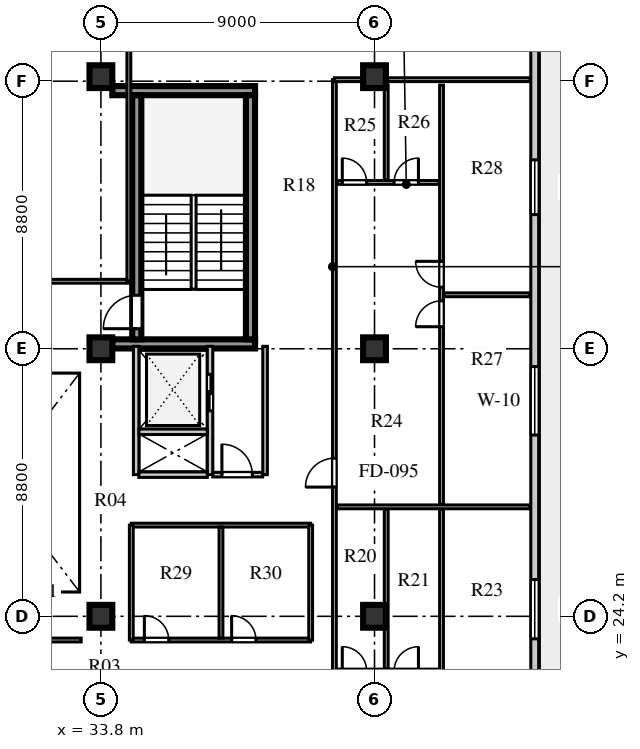
"""IFC4 building model, lengths in metres.
Left out: names, types, materials, properties, quantities, classifications, styles, units other than length and angle.
Written with IfcOpenShell. Run it as: python <this file> out.ifc"""

import sys

from ifc_helpers import new_model, si_unit, direction, frame, frame_2d, origin, origin_2d, place, context, subcontext, project, spatial, rectangle, extrude, element, fill, save


model = new_model("IFC4")
c1 = context("Model", 3, precision=1e-05, world=origin(), true_north=direction((0.0, 1.0)))
c2 = subcontext(c1, "Body", "Model", "MODEL_VIEW")
j1 = project(units=[si_unit("LENGTHUNIT", "METRE"), si_unit("PLANEANGLEUNIT", "RADIAN")], contexts=[c1])
p1 = place(None, origin())
s1 = spatial("IfcSite", under=j1, at=p1, CompositionType="ELEMENT")
p2 = place(p1, origin())
s2 = spatial("IfcBuilding", under=s1, at=p2, CompositionType="ELEMENT")
p3 = place(p2, frame((0.0, 0.0, 272.6)))
s3 = spatial("IfcBuildingStorey", under=s2, at=p3, CompositionType="ELEMENT", Elevation=272.6)
for number, where, z_axis, x_axis in (
    (1, (34.175, 33.16, 0.0), (0.0, 0.0, 1.0), (1.0, 0.0, 0.0)),
    (2, (34.175, 41.49, 0.0), (0.0, 0.0, 1.0), (1.0, 0.0, 0.0)),
):
    element("IfcWall", number, at=place(p3, frame(where, z_axis=z_axis, x_axis=x_axis)), inside=s3, PredefinedType="SHEAR", context=c2, shape_type="SweptSolid", body=[
        extrude(rectangle(XDim=4.695, YDim=0.3, at=frame_2d((2.348, 0.0))), origin(), (0.0, 0.0, 1.0), 3.66),
    ])
p4 = place(p3, frame((34.98, 33.31, 0.0), z_axis=(0.0, 0.0, 1.0), x_axis=(0.0, 1.0, 0.0)))
e3 = element("IfcWall", 3, at=p4, inside=s3, PredefinedType="SHEAR", context=c2, shape_type="SweptSolid", body=[
    extrude(rectangle(XDim=8.03, YDim=0.3, at=frame_2d((4.015, 0.0))), origin(), (0.0, 0.0, 1.0), 3.66),
])
p5 = place(p4, frame((0.35, 0.0, 0.0)))
e4 = element("IfcOpeningElement", 4, at=p5, cuts=e3, PredefinedType="OPENING", context=c2, shape_type="SweptSolid", body=[
    extrude(rectangle(XDim=1.1, YDim=2.1, at=frame_2d((0.55, 1.05))), frame((0.0, 0.16, 0.0), z_axis=(0.0, -1.0, 0.0), x_axis=(1.0, 0.0, 0.0)), (0.0, 0.0, 1.0), 0.32),
])
p6 = place(p3, frame((38.72, 33.31, 0.0), z_axis=(0.0, 0.0, 1.0), x_axis=(0.0, 1.0, 0.0)))
e5 = element("IfcWall", 5, at=p6, inside=s3, PredefinedType="SHEAR", context=c2, shape_type="SweptSolid", body=[
    extrude(rectangle(XDim=8.03, YDim=0.3, at=frame_2d((4.015, 0.0))), origin(), (0.0, 0.0, 1.0), 3.66),
])
for number, where, z_axis, x_axis in (
    (6, (33.8, 24.2, 0.0), (0.0, 0.0, 1.0), (1.0, 0.0, 0.0)),
    (7, (33.8, 33.0, 0.0), (0.0, 0.0, 1.0), (1.0, 0.0, 0.0)),
    (8, (33.8, 41.95, 0.0), (0.0, 0.0, 1.0), (1.0, 0.0, 0.0)),
    (9, (42.8, 24.2, 0.0), (0.0, 0.0, 1.0), (1.0, 0.0, 0.0)),
    (10, (42.8, 33.0, 0.0), (0.0, 0.0, 1.0), (1.0, 0.0, 0.0)),
    (11, (42.8, 41.95, 0.0), (0.0, 0.0, 1.0), (1.0, 0.0, 0.0)),
):
    element("IfcColumn", number, at=place(p3, frame(where, z_axis=z_axis, x_axis=x_axis)), inside=s3, PredefinedType="COLUMN", context=c2, shape_type="SweptSolid", body=[
        extrude(rectangle(XDim=0.75, YDim=0.75, at=origin_2d()), origin(), (0.0, 0.0, 1.0), 3.66),
    ])
p7 = place(p3, frame((48.07, 13.41, 0.0), z_axis=(0.0, 0.0, 1.0), x_axis=(0.0, 1.0, 0.0)))
e12 = element("IfcWall", 12, at=p7, inside=s3, PredefinedType="SOLIDWALL", context=c2, shape_type="SweptSolid", body=[
    extrude(rectangle(XDim=30.38, YDim=0.26, at=frame_2d((15.19, 0.0))), origin(), (0.0, 0.0, 1.0), 3.66),
])
p8 = place(p7, frame((2.43, 0.0, 0.0)))
e13 = element("IfcOpeningElement", 13, at=p8, cuts=e12, PredefinedType="OPENING", context=c2, shape_type="SweptSolid", body=[
    extrude(rectangle(XDim=1.0, YDim=2.05, at=frame_2d((0.5, 1.025))), frame((0.0, 0.14, 0.0), z_axis=(0.0, -1.0, 0.0), x_axis=(1.0, 0.0, 0.0)), (0.0, 0.0, 1.0), 0.28),
])
p9 = place(p7, frame((4.75, 0.0, 0.8)))
e14 = element("IfcOpeningElement", 14, at=p9, cuts=e12, PredefinedType="OPENING", context=c2, shape_type="SweptSolid", body=[
    extrude(rectangle(XDim=1.65, YDim=1.95, at=frame_2d((0.825, 0.975))), frame((0.0, 0.14, 0.0), z_axis=(0.0, -1.0, 0.0), x_axis=(1.0, 0.0, 0.0)), (0.0, 0.0, 1.0), 0.28),
])
p10 = place(p7, frame((10.05, 0.0, 0.8)))
e15 = element("IfcOpeningElement", 15, at=p10, cuts=e12, PredefinedType="OPENING", context=c2, shape_type="SweptSolid", body=[
    extrude(rectangle(XDim=1.95, YDim=2.0, at=frame_2d((0.975, 1.0))), frame((0.0, 0.14, 0.0), z_axis=(0.0, -1.0, 0.0), x_axis=(1.0, 0.0, 0.0)), (0.0, 0.0, 1.0), 0.28),
])
p11 = place(p7, frame((16.753, 0.0, 0.8)))
e16 = element("IfcOpeningElement", 16, at=p11, cuts=e12, PredefinedType="OPENING", context=c2, shape_type="SweptSolid", body=[
    extrude(rectangle(XDim=2.25, YDim=2.0, at=frame_2d((1.125, 1.0))), frame((0.0, 0.14, 0.0), z_axis=(0.0, -1.0, 0.0), x_axis=(1.0, 0.0, 0.0)), (0.0, 0.0, 1.0), 0.28),
])
p12 = place(p7, frame((24.003, 0.0, 0.8)))
e17 = element("IfcOpeningElement", 17, at=p12, cuts=e12, PredefinedType="OPENING", context=c2, shape_type="SweptSolid", body=[
    extrude(rectangle(XDim=1.8, YDim=2.0, at=frame_2d((0.9, 1.0))), frame((0.0, 0.14, 0.0), z_axis=(0.0, -1.0, 0.0), x_axis=(1.0, 0.0, 0.0)), (0.0, 0.0, 1.0), 0.28),
])
p13 = place(p3, frame((34.96, 28.86, 0.0), z_axis=(0.0, 0.0, 1.0), x_axis=(0.0, 1.0, 0.0)))
e18 = element("IfcWall", 18, at=p13, inside=s3, PredefinedType="SOLIDWALL", context=c2, shape_type="SweptSolid", body=[
    extrude(rectangle(XDim=4.22, YDim=0.18, at=frame_2d((2.11, 0.0))), origin(), (0.0, 0.0, 1.0), 3.66),
])
p14 = place(p3, frame((37.39, 28.86, 0.0), z_axis=(0.0, 0.0, 1.0), x_axis=(0.0, 1.0, 0.0)))
e19 = element("IfcWall", 19, at=p14, inside=s3, PredefinedType="SOLIDWALL", context=c2, shape_type="SweptSolid", body=[
    extrude(rectangle(XDim=4.22, YDim=0.18, at=frame_2d((2.11, 0.0))), origin(), (0.0, 0.0, 1.0), 3.66),
])
p15 = place(p14, frame((2.1, 0.0, 0.0)))
e20 = element("IfcOpeningElement", 20, at=p15, cuts=e19, PredefinedType="OPENING", context=c2, shape_type="SweptSolid", body=[
    extrude(rectangle(XDim=1.2, YDim=2.12, at=frame_2d((0.6, 1.06))), frame((0.0, 0.1, 0.0), z_axis=(0.0, -1.0, 0.0), x_axis=(1.0, 0.0, 0.0)), (0.0, 0.0, 1.0), 0.2),
])
for number, where, z_axis, x_axis in (
    (21, (35.05, 28.86, 0.0), (0.0, 0.0, 1.0), (1.0, 0.0, 0.0)),
    (22, (35.05, 30.27, 0.0), (0.0, 0.0, 1.0), (1.0, 0.0, 0.0)),
):
    element("IfcWall", number, at=place(p3, frame(where, z_axis=z_axis, x_axis=x_axis)), inside=s3, PredefinedType="SOLIDWALL", context=c2, shape_type="SweptSolid", body=[
        extrude(rectangle(XDim=2.25, YDim=0.18, at=frame_2d((1.125, 0.0))), origin(), (0.0, 0.0, 1.0), 3.66),
    ])
p16 = place(p3, frame((39.2, 28.86, 0.0), z_axis=(0.0, 0.0, 1.0), x_axis=(0.0, 1.0, 0.0)))
e23 = element("IfcWall", 23, at=p16, inside=s3, PredefinedType="PARTITIONING", context=c2, shape_type="SweptSolid", body=[
    extrude(rectangle(XDim=4.22, YDim=0.15, at=frame_2d((2.11, 0.0))), origin(), (0.0, 0.0, 1.0), 3.66),
])
p17 = place(p3, frame((37.48, 28.86, 0.0), z_axis=(0.0, 0.0, 1.0), x_axis=(1.0, 0.0, 0.0)))
e24 = element("IfcWall", 24, at=p17, inside=s3, PredefinedType="PARTITIONING", context=c2, shape_type="SweptSolid", body=[
    extrude(rectangle(XDim=1.64, YDim=0.15, at=frame_2d((0.82, 0.0))), origin(), (0.0, 0.0, 1.0), 3.66),
])
p18 = place(p17, frame((0.3, 0.0, 0.0)))
e25 = element("IfcOpeningElement", 25, at=p18, cuts=e24, PredefinedType="OPENING", context=c2, shape_type="SweptSolid", body=[
    extrude(rectangle(XDim=1.0, YDim=2.1, at=frame_2d((0.5, 1.05))), frame((0.0, 0.085, 0.0), z_axis=(0.0, -1.0, 0.0), x_axis=(1.0, 0.0, 0.0)), (0.0, 0.0, 1.0), 0.17),
])
p19 = place(p3, frame((27.15, 23.42, 0.0), z_axis=(0.0, 0.0, 1.0), x_axis=(1.0, 0.0, 0.0)))
e26 = element("IfcWall", 26, at=p19, inside=s3, PredefinedType="PLUMBINGWALL", context=c2, shape_type="SweptSolid", body=[
    extrude(rectangle(XDim=6.0, YDim=0.125, at=frame_2d((3.0, 0.0))), origin(), (0.0, 0.0, 1.0), 3.66),
])
p20 = place(p3, frame((25.22, 35.22, 0.0), z_axis=(0.0, 0.0, 1.0), x_axis=(1.0, 0.0, 0.0)))
e27 = element("IfcWall", 27, at=p20, inside=s3, PredefinedType="PLUMBINGWALL", context=c2, shape_type="SweptSolid", body=[
    extrude(rectangle(XDim=9.5, YDim=0.125, at=frame_2d((4.75, 0.0))), origin(), (0.0, 0.0, 1.0), 3.66),
])
p21 = place(p20, frame((1.8, 0.0, 0.0)))
e28 = element("IfcOpeningElement", 28, at=p21, cuts=e27, PredefinedType="OPENING", context=c2, shape_type="SweptSolid", body=[
    extrude(rectangle(XDim=1.1, YDim=2.08, at=frame_2d((0.55, 1.04))), frame((0.0, 0.073, 0.0), z_axis=(0.0, -1.0, 0.0), x_axis=(1.0, 0.0, 0.0)), (0.0, 0.0, 1.0), 0.145),
])
p22 = place(p3, frame((34.72, 35.22, 0.0), z_axis=(0.0, 0.0, 1.0), x_axis=(0.0, 1.0, 0.0)))
e29 = element("IfcWall", 29, at=p22, inside=s3, PredefinedType="PLUMBINGWALL", context=c2, shape_type="SweptSolid", body=[
    extrude(rectangle(XDim=11.6, YDim=0.125, at=frame_2d((5.8, 0.0))), origin(), (0.0, 0.0, 1.0), 3.66),
])
p23 = place(p3, frame((41.48, 15.35, 0.0), z_axis=(0.0, 0.0, 1.0), x_axis=(0.0, 1.0, 0.0)))
e30 = element("IfcWall", 30, at=p23, inside=s3, PredefinedType="PLUMBINGWALL", context=c2, shape_type="SweptSolid", body=[
    extrude(rectangle(XDim=26.5, YDim=0.125, at=frame_2d((13.25, 0.0))), origin(), (0.0, 0.0, 1.0), 3.66),
])
p24 = place(p23, frame((0.75, 0.0, 0.0)))
e31 = element("IfcOpeningElement", 31, at=p24, cuts=e30, PredefinedType="OPENING", context=c2, shape_type="SweptSolid", body=[
    extrude(rectangle(XDim=0.95, YDim=2.1, at=frame_2d((0.475, 1.05))), frame((0.0, 0.073, 0.0), z_axis=(0.0, -1.0, 0.0), x_axis=(1.0, 0.0, 0.0)), (0.0, 0.0, 1.0), 0.145),
])
p25 = place(p23, frame((13.1, 0.0, 0.0)))
e32 = element("IfcOpeningElement", 32, at=p25, cuts=e30, PredefinedType="OPENING", context=c2, shape_type="SweptSolid", body=[
    extrude(rectangle(XDim=0.95, YDim=2.1, at=frame_2d((0.475, 1.05))), frame((0.0, 0.073, 0.0), z_axis=(0.0, -1.0, 0.0), x_axis=(1.0, 0.0, 0.0)), (0.0, 0.0, 1.0), 0.145),
])
p26 = place(p3, frame((41.48, 41.85, 0.0), z_axis=(0.0, 0.0, 1.0), x_axis=(1.0, 0.0, 0.0)))
e33 = element("IfcWall", 33, at=p26, inside=s3, PredefinedType="PLUMBINGWALL", context=c2, shape_type="SweptSolid", body=[
    extrude(rectangle(XDim=6.44, YDim=0.125, at=frame_2d((3.22, 0.0))), origin(), (0.0, 0.0, 1.0), 3.06),
])
p27 = place(p3, frame((45.004, 15.53, 0.0), z_axis=(0.0, 0.0, 1.0), x_axis=(0.0, 1.0, 0.0)))
e34 = element("IfcWall", 34, at=p27, inside=s3, PredefinedType="PLUMBINGWALL", context=c2, shape_type="SweptSolid", body=[
    extrude(rectangle(XDim=12.19, YDim=0.125, at=frame_2d((6.095, 0.0))), origin(), (0.0, 0.0, 1.0), 3.66),
])
p28 = place(p27, frame((4.49, 0.0, 0.0)))
e35 = element("IfcOpeningElement", 35, at=p28, cuts=e34, PredefinedType="OPENING", context=c2, shape_type="SweptSolid", body=[
    extrude(rectangle(XDim=0.85, YDim=2.08, at=frame_2d((0.425, 1.04))), frame((0.0, 0.073, 0.0), z_axis=(0.0, -1.0, 0.0), x_axis=(1.0, 0.0, 0.0)), (0.0, 0.0, 1.0), 0.145),
])
p29 = place(p27, frame((5.79, 0.0, 0.0)))
e36 = element("IfcOpeningElement", 36, at=p29, cuts=e34, PredefinedType="OPENING", context=c2, shape_type="SweptSolid", body=[
    extrude(rectangle(XDim=0.85, YDim=2.08, at=frame_2d((0.425, 1.04))), frame((0.0, 0.073, 0.0), z_axis=(0.0, -1.0, 0.0), x_axis=(1.0, 0.0, 0.0)), (0.0, 0.0, 1.0), 0.145),
])
p30 = place(p3, frame((41.58, 22.4, 0.0), z_axis=(0.0, 0.0, 1.0), x_axis=(1.0, 0.0, 0.0)))
e37 = element("IfcWall", 37, at=p30, inside=s3, PredefinedType="PLUMBINGWALL", context=c2, shape_type="SweptSolid", body=[
    extrude(rectangle(XDim=3.344, YDim=0.125, at=frame_2d((1.672, 0.0))), origin(), (0.0, 0.0, 1.0), 3.66),
])
p31 = place(p30, frame((0.16, 0.0, 0.0)))
e38 = element("IfcOpeningElement", 38, at=p31, cuts=e37, PredefinedType="OPENING", context=c2, shape_type="SweptSolid", body=[
    extrude(rectangle(XDim=0.8, YDim=2.05, at=frame_2d((0.4, 1.025))), frame((0.0, 0.073, 0.0), z_axis=(0.0, -1.0, 0.0), x_axis=(1.0, 0.0, 0.0)), (0.0, 0.0, 1.0), 0.145),
])
p32 = place(p30, frame((1.865, 0.0, 0.0)))
e39 = element("IfcOpeningElement", 39, at=p32, cuts=e37, PredefinedType="OPENING", context=c2, shape_type="SweptSolid", body=[
    extrude(rectangle(XDim=0.8, YDim=2.05, at=frame_2d((0.4, 1.025))), frame((0.0, 0.073, 0.0), z_axis=(0.0, -1.0, 0.0), x_axis=(1.0, 0.0, 0.0)), (0.0, 0.0, 1.0), 0.145),
])
p33 = place(p3, frame((43.185, 22.48, 0.0), z_axis=(0.0, 0.0, 1.0), x_axis=(0.0, 1.0, 0.0)))
e40 = element("IfcWall", 40, at=p33, inside=s3, PredefinedType="PLUMBINGWALL", context=c2, shape_type="SweptSolid", body=[
    extrude(rectangle(XDim=5.24, YDim=0.125, at=frame_2d((2.62, 0.0))), origin(), (0.0, 0.0, 1.0), 3.66),
])
p34 = place(p3, frame((41.56, 27.8, 0.0), z_axis=(0.0, 0.0, 1.0), x_axis=(1.0, 0.0, 0.0)))
e41 = element("IfcWall", 41, at=p34, inside=s3, PredefinedType="PLUMBINGWALL", context=c2, shape_type="SweptSolid", body=[
    extrude(rectangle(XDim=6.36, YDim=0.125, at=frame_2d((3.18, 0.0))), origin(), (0.0, 0.0, 1.0), 3.66),
])
p35 = place(p3, frame((45.004, 27.88, 0.0), z_axis=(0.0, 0.0, 1.0), x_axis=(0.0, 1.0, 0.0)))
e42 = element("IfcWall", 42, at=p35, inside=s3, PredefinedType="PLUMBINGWALL", context=c2, shape_type="SweptSolid", body=[
    extrude(rectangle(XDim=13.79, YDim=0.125, at=frame_2d((6.895, 0.0))), origin(), (0.0, 0.0, 1.0), 3.66),
])
p36 = place(p35, frame((5.845, 0.0, 0.0)))
e43 = element("IfcOpeningElement", 43, at=p36, cuts=e42, PredefinedType="OPENING", context=c2, shape_type="SweptSolid", body=[
    extrude(rectangle(XDim=0.85, YDim=2.08, at=frame_2d((0.425, 1.04))), frame((0.0, 0.073, 0.0), z_axis=(0.0, -1.0, 0.0), x_axis=(1.0, 0.0, 0.0)), (0.0, 0.0, 1.0), 0.145),
])
p37 = place(p35, frame((7.145, 0.0, 0.0)))
e44 = element("IfcOpeningElement", 44, at=p37, cuts=e42, PredefinedType="OPENING", context=c2, shape_type="SweptSolid", body=[
    extrude(rectangle(XDim=0.85, YDim=2.08, at=frame_2d((0.425, 1.04))), frame((0.0, 0.073, 0.0), z_axis=(0.0, -1.0, 0.0), x_axis=(1.0, 0.0, 0.0)), (0.0, 0.0, 1.0), 0.145),
])
p38 = place(p3, frame((41.58, 38.47, 0.0), z_axis=(0.0, 0.0, 1.0), x_axis=(1.0, 0.0, 0.0)))
e45 = element("IfcWall", 45, at=p38, inside=s3, PredefinedType="PLUMBINGWALL", context=c2, shape_type="SweptSolid", body=[
    extrude(rectangle(XDim=3.344, YDim=0.125, at=frame_2d((1.672, 0.0))), origin(), (0.0, 0.0, 1.0), 3.66),
])
p39 = place(p38, frame((0.16, 0.0, 0.0)))
e46 = element("IfcOpeningElement", 46, at=p39, cuts=e45, PredefinedType="OPENING", context=c2, shape_type="SweptSolid", body=[
    extrude(rectangle(XDim=0.8, YDim=2.05, at=frame_2d((0.4, 1.025))), frame((0.0, 0.073, 0.0), z_axis=(0.0, -1.0, 0.0), x_axis=(1.0, 0.0, 0.0)), (0.0, 0.0, 1.0), 0.145),
])
p40 = place(p38, frame((1.865, 0.0, 0.0)))
e47 = element("IfcOpeningElement", 47, at=p40, cuts=e45, PredefinedType="OPENING", context=c2, shape_type="SweptSolid", body=[
    extrude(rectangle(XDim=0.8, YDim=2.05, at=frame_2d((0.4, 1.025))), frame((0.0, 0.073, 0.0), z_axis=(0.0, -1.0, 0.0), x_axis=(1.0, 0.0, 0.0)), (0.0, 0.0, 1.0), 0.145),
])
p41 = place(p3, frame((43.185, 38.55, 0.0), z_axis=(0.0, 0.0, 1.0), x_axis=(0.0, 1.0, 0.0)))
e48 = element("IfcWall", 48, at=p41, inside=s3, PredefinedType="PLUMBINGWALL", context=c2, shape_type="SweptSolid", body=[
    extrude(rectangle(XDim=3.12, YDim=0.125, at=frame_2d((1.56, 0.0))), origin(), (0.0, 0.0, 1.0), 3.66),
])
p42 = place(p3, frame((45.084, 34.775, 0.0), z_axis=(0.0, 0.0, 1.0), x_axis=(1.0, 0.0, 0.0)))
e49 = element("IfcWall", 49, at=p42, inside=s3, PredefinedType="PLUMBINGWALL", context=c2, shape_type="SweptSolid", body=[
    extrude(rectangle(XDim=2.836, YDim=0.125, at=frame_2d((1.418, 0.0))), origin(), (0.0, 0.0, 1.0), 3.66),
])
p43 = place(p3, frame((34.8, 23.42, 0.0), z_axis=(0.0, 0.0, 1.0), x_axis=(1.0, 0.0, 0.0)))
e50 = element("IfcWall", 50, at=p43, inside=s3, PredefinedType="PLUMBINGWALL", context=c2, shape_type="SweptSolid", body=[
    extrude(rectangle(XDim=5.9, YDim=0.125, at=frame_2d((2.95, 0.0))), origin(), (0.0, 0.0, 1.0), 3.66),
])
p44 = place(p43, frame((0.43, 0.0, 0.0)))
e51 = element("IfcOpeningElement", 51, at=p44, cuts=e50, PredefinedType="OPENING", context=c2, shape_type="SweptSolid", body=[
    extrude(rectangle(XDim=0.8, YDim=2.05, at=frame_2d((0.4, 1.025))), frame((0.0, 0.073, 0.0), z_axis=(0.0, -1.0, 0.0), x_axis=(1.0, 0.0, 0.0)), (0.0, 0.0, 1.0), 0.145),
])
p45 = place(p43, frame((3.3, 0.0, 0.0)))
e52 = element("IfcOpeningElement", 52, at=p45, cuts=e50, PredefinedType="OPENING", context=c2, shape_type="SweptSolid", body=[
    extrude(rectangle(XDim=0.8, YDim=2.05, at=frame_2d((0.4, 1.025))), frame((0.0, 0.073, 0.0), z_axis=(0.0, -1.0, 0.0), x_axis=(1.0, 0.0, 0.0)), (0.0, 0.0, 1.0), 0.145),
])
p46 = place(p3, frame((34.8, 27.2, 0.0), z_axis=(0.0, 0.0, 1.0), x_axis=(1.0, 0.0, 0.0)))
e53 = element("IfcWall", 53, at=p46, inside=s3, PredefinedType="PLUMBINGWALL", context=c2, shape_type="SweptSolid", body=[
    extrude(rectangle(XDim=5.9, YDim=0.125, at=frame_2d((2.95, 0.0))), origin(), (0.0, 0.0, 1.0), 3.36),
])
for number, where, z_axis, x_axis in (
    (54, (34.8, 23.42, 0.0), (0.0, 0.0, 1.0), (0.0, 1.0, 0.0)),
    (55, (40.7, 23.42, 0.0), (0.0, 0.0, 1.0), (0.0, 1.0, 0.0)),
):
    element("IfcWall", number, at=place(p3, frame(where, z_axis=z_axis, x_axis=x_axis)), inside=s3, PredefinedType="PLUMBINGWALL", context=c2, shape_type="SweptSolid", body=[
        extrude(rectangle(XDim=3.78, YDim=0.125, at=frame_2d((1.89, 0.0))), origin(), (0.0, 0.0, 1.0), 3.66),
    ])
p47 = place(p3, frame((37.75, 23.48, 0.0), z_axis=(0.0, 0.0, 1.0), x_axis=(0.0, 1.0, 0.0)))
e56 = element("IfcWall", 56, at=p47, inside=s3, PredefinedType="PLUMBINGWALL", context=c2, shape_type="SweptSolid", body=[
    extrude(rectangle(XDim=3.66, YDim=0.125, at=frame_2d((1.83, 0.0))), origin(), (0.0, 0.0, 1.0), 3.66),
])
p48 = place(p10, origin())
e57 = element("IfcWindow", 57, at=p48, inside=s3, PartitioningType="SINGLE_PANEL", PredefinedType="WINDOW", context=c2, shape_type="SweptSolid", body=[
    extrude(rectangle(XDim=1.95, YDim=2.0, at=frame_2d((0.975, 1.0))), frame((0.0, 0.03, 0.0), z_axis=(0.0, -1.0, 0.0), x_axis=(1.0, 0.0, 0.0)), (0.0, 0.0, 1.0), 0.06),
])
fill(e15, e57)
p49 = place(p11, origin())
e58 = element("IfcWindow", 58, at=p49, inside=s3, PartitioningType="SINGLE_PANEL", PredefinedType="WINDOW", context=c2, shape_type="SweptSolid", body=[
    extrude(rectangle(XDim=2.25, YDim=2.0, at=frame_2d((1.125, 1.0))), frame((0.0, 0.03, 0.0), z_axis=(0.0, -1.0, 0.0), x_axis=(1.0, 0.0, 0.0)), (0.0, 0.0, 1.0), 0.06),
])
fill(e16, e58)
p50 = place(p12, origin())
e59 = element("IfcWindow", 59, at=p50, inside=s3, PartitioningType="SINGLE_PANEL", PredefinedType="WINDOW", context=c2, shape_type="SweptSolid", body=[
    extrude(rectangle(XDim=1.8, YDim=2.0, at=frame_2d((0.9, 1.0))), frame((0.0, 0.03, 0.0), z_axis=(0.0, -1.0, 0.0), x_axis=(1.0, 0.0, 0.0)), (0.0, 0.0, 1.0), 0.06),
])
fill(e17, e59)
p51 = place(p5, origin())
e60 = element("IfcDoor", 60, at=p51, inside=s3, OperationType="SINGLE_SWING_LEFT", PredefinedType="DOOR", context=c2, shape_type="SweptSolid", body=[
    extrude(rectangle(XDim=1.1, YDim=2.1, at=frame_2d((0.55, 1.05))), frame((0.0, 0.025, 0.0), z_axis=(0.0, -1.0, 0.0), x_axis=(1.0, 0.0, 0.0)), (0.0, 0.0, 1.0), 0.05),
])
fill(e4, e60)
p52 = place(p15, frame((1.2, 0.0, 0.0), z_axis=(0.0, 0.0, 1.0), x_axis=(-1.0, 0.0, 0.0)))
e61 = element("IfcDoor", 61, at=p52, inside=s3, OperationType="DOUBLE_DOOR_SLIDING", PredefinedType="DOOR", context=c2, shape_type="SweptSolid", body=[
    extrude(rectangle(XDim=1.2, YDim=2.12, at=frame_2d((0.6, 1.06))), frame((0.0, 0.025, 0.0), z_axis=(0.0, -1.0, 0.0), x_axis=(1.0, 0.0, 0.0)), (0.0, 0.0, 1.0), 0.05),
])
fill(e20, e61)
p53 = place(p18, origin())
e62 = element("IfcDoor", 62, at=p53, inside=s3, OperationType="SINGLE_SWING_LEFT", PredefinedType="DOOR", context=c2, shape_type="SweptSolid", body=[
    extrude(rectangle(XDim=1.0, YDim=2.1, at=frame_2d((0.5, 1.05))), frame((0.0, 0.025, 0.0), z_axis=(0.0, -1.0, 0.0), x_axis=(1.0, 0.0, 0.0)), (0.0, 0.0, 1.0), 0.05),
])
fill(e25, e62)
p54 = place(p39, origin())
e63 = element("IfcDoor", 63, at=p54, inside=s3, OperationType="SINGLE_SWING_LEFT", PredefinedType="DOOR", context=c2, shape_type="SweptSolid", body=[
    extrude(rectangle(XDim=0.8, YDim=2.05, at=frame_2d((0.4, 1.025))), frame((0.0, 0.025, 0.0), z_axis=(0.0, -1.0, 0.0), x_axis=(1.0, 0.0, 0.0)), (0.0, 0.0, 1.0), 0.05),
])
fill(e46, e63)
p55 = place(p40, origin())
e64 = element("IfcDoor", 64, at=p55, inside=s3, OperationType="SINGLE_SWING_RIGHT", PredefinedType="DOOR", context=c2, shape_type="SweptSolid", body=[
    extrude(rectangle(XDim=0.8, YDim=2.05, at=frame_2d((0.4, 1.025))), frame((0.0, 0.025, 0.0), z_axis=(0.0, -1.0, 0.0), x_axis=(1.0, 0.0, 0.0)), (0.0, 0.0, 1.0), 0.05),
])
fill(e47, e64)
p56 = place(p36, origin())
e65 = element("IfcDoor", 65, at=p56, inside=s3, OperationType="SINGLE_SWING_LEFT", PredefinedType="DOOR", context=c2, shape_type="SweptSolid", body=[
    extrude(rectangle(XDim=0.85, YDim=2.08, at=frame_2d((0.425, 1.04))), frame((0.0, 0.025, 0.0), z_axis=(0.0, -1.0, 0.0), x_axis=(1.0, 0.0, 0.0)), (0.0, 0.0, 1.0), 0.05),
])
fill(e43, e65)
p57 = place(p37, origin())
e66 = element("IfcDoor", 66, at=p57, inside=s3, OperationType="SINGLE_SWING_RIGHT", PredefinedType="DOOR", context=c2, shape_type="SweptSolid", body=[
    extrude(rectangle(XDim=0.85, YDim=2.08, at=frame_2d((0.425, 1.04))), frame((0.0, 0.025, 0.0), z_axis=(0.0, -1.0, 0.0), x_axis=(1.0, 0.0, 0.0)), (0.0, 0.0, 1.0), 0.05),
])
fill(e44, e66)
p58 = place(p25, origin())
e67 = element("IfcDoor", 67, at=p58, inside=s3, OperationType="SINGLE_SWING_LEFT", PredefinedType="DOOR", context=c2, shape_type="SweptSolid", body=[
    extrude(rectangle(XDim=0.95, YDim=2.1, at=frame_2d((0.475, 1.05))), frame((0.0, 0.025, 0.0), z_axis=(0.0, -1.0, 0.0), x_axis=(1.0, 0.0, 0.0)), (0.0, 0.0, 1.0), 0.05),
])
fill(e32, e67)
p59 = place(p44, origin())
e68 = element("IfcDoor", 68, at=p59, inside=s3, OperationType="SINGLE_SWING_LEFT", PredefinedType="DOOR", context=c2, shape_type="SweptSolid", body=[
    extrude(rectangle(XDim=0.8, YDim=2.05, at=frame_2d((0.4, 1.025))), frame((0.0, 0.025, 0.0), z_axis=(0.0, -1.0, 0.0), x_axis=(1.0, 0.0, 0.0)), (0.0, 0.0, 1.0), 0.05),
])
fill(e51, e68)
p60 = place(p45, origin())
e69 = element("IfcDoor", 69, at=p60, inside=s3, OperationType="SINGLE_SWING_LEFT", PredefinedType="DOOR", context=c2, shape_type="SweptSolid", body=[
    extrude(rectangle(XDim=0.8, YDim=2.05, at=frame_2d((0.4, 1.025))), frame((0.0, 0.025, 0.0), z_axis=(0.0, -1.0, 0.0), x_axis=(1.0, 0.0, 0.0)), (0.0, 0.0, 1.0), 0.05),
])
fill(e52, e69)
save(model, sys.argv[1])
